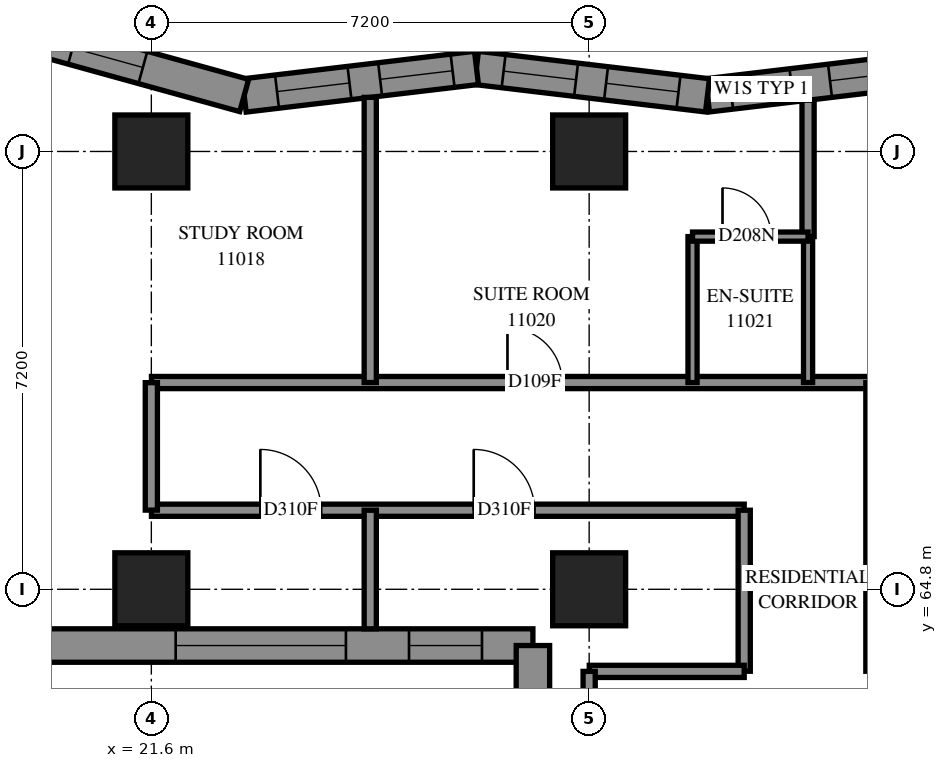
"""IFC4 building model, lengths in metres.
Left out: names, types, materials, properties, quantities, classifications, styles, units other than length and angle.
Written with IfcOpenShell. Run it as: python <this file> out.ifc"""

import sys

from ifc_helpers import new_model, si_unit, direction, frame, frame_2d, origin, origin_2d, place, context, subcontext, project, spatial, polyline, rectangle, outline, extrude, element, fill, save


model = new_model("IFC4")
c1 = context("Model", 3, precision=1e-05, world=origin(), true_north=direction((0.0, 1.0)))
c2 = subcontext(c1, "Body", "Model", "MODEL_VIEW")
j1 = project(units=[si_unit("LENGTHUNIT", "METRE"), si_unit("PLANEANGLEUNIT", "RADIAN")], contexts=[c1])
p1 = place(None, origin())
s1 = spatial("IfcSite", under=j1, at=p1, CompositionType="ELEMENT")
p2 = place(p1, origin())
s2 = spatial("IfcBuilding", under=s1, at=p2, CompositionType="ELEMENT")
p3 = place(p2, frame((0.0, 0.0, 44.0)))
s3 = spatial("IfcBuildingStorey", under=s2, at=p3, CompositionType="ELEMENT", Elevation=44.0)
for number, where, z_axis, x_axis in (
    (1, (21.6, 64.8, 0.0), (0.0, 0.0, 1.0), (1.0, 0.0, 0.0)),
    (2, (21.6, 72.0, 0.0), (0.0, 0.0, 1.0), (1.0, 0.0, 0.0)),
    (3, (28.8, 64.8, 0.0), (0.0, 0.0, 1.0), (1.0, 0.0, 0.0)),
    (4, (28.8, 72.0, 0.0), (0.0, 0.0, 1.0), (1.0, 0.0, 0.0)),
):
    element("IfcColumn", number, at=place(p3, frame(where, z_axis=z_axis, x_axis=x_axis)), inside=s3, PredefinedType="COLUMN", context=c2, shape_type="SweptSolid", body=[
        extrude(rectangle(XDim=1.2, YDim=1.2, at=origin_2d()), origin(), (0.0, 0.0, 1.0), 3.1),
    ])
p4 = place(p3, frame((34.545, 73.374, 0.0), z_axis=(0.0, 0.0, 1.0), x_axis=(-0.9930269402, -0.1178876415, 0.0)))
e5 = element("IfcWall", 5, at=p4, inside=s3, PredefinedType="SOLIDWALL", context=c2, shape_type="SweptSolid", body=[
    extrude(outline(polyline([(-0.033, -0.275), (3.793, -0.275), (3.858, 0.275), (0.033, 0.275), (-0.033, -0.275)])), origin(), (0.0, 0.0, 1.0), 3.1),
])
p5 = place(p4, frame((0.596, 0.0, 0.5)))
e6 = element("IfcOpeningElement", 6, at=p5, cuts=e5, PredefinedType="OPENING", context=c2, shape_type="SweptSolid", body=[
    extrude(rectangle(XDim=1.2, YDim=2.45, at=frame_2d((0.6, 1.225))), frame((0.0, 0.285, 0.0), z_axis=(0.0, -1.0, 0.0), x_axis=(1.0, 0.0, 0.0)), (0.0, 0.0, 1.0), 0.57),
])
p6 = place(p4, frame((2.434, 0.0, 0.45)))
e7 = element("IfcOpeningElement", 7, at=p6, cuts=e5, PredefinedType="OPENING", context=c2, shape_type="SweptSolid", body=[
    extrude(rectangle(XDim=1.0, YDim=2.5, at=frame_2d((0.5, 1.25))), frame((0.0, 0.285, 0.0), z_axis=(0.0, -1.0, 0.0), x_axis=(1.0, 0.0, 0.0)), (0.0, 0.0, 1.0), 0.57),
])
p7 = place(p3, frame((30.746, 72.923, 0.0), z_axis=(0.0, 0.0, 1.0), x_axis=(-0.9930269402, 0.1178876415, 0.0)))
e8 = element("IfcWall", 8, at=p7, inside=s3, PredefinedType="SOLIDWALL", context=c2, shape_type="SweptSolid", body=[
    extrude(outline(polyline([(0.033, -0.275), (3.858, -0.275), (3.793, 0.275), (-0.033, 0.275), (0.033, -0.275)])), origin(), (0.0, 0.0, 1.0), 3.1),
])
p8 = place(p7, frame((0.48, 0.0, 0.5)))
e9 = element("IfcOpeningElement", 9, at=p8, cuts=e8, PredefinedType="OPENING", context=c2, shape_type="SweptSolid", body=[
    extrude(rectangle(XDim=1.2, YDim=2.45, at=frame_2d((0.6, 1.225))), frame((0.0, 0.285, 0.0), z_axis=(0.0, -1.0, 0.0), x_axis=(1.0, 0.0, 0.0)), (0.0, 0.0, 1.0), 0.57),
])
p9 = place(p7, frame((2.176, 0.0, 0.5)))
e10 = element("IfcOpeningElement", 10, at=p9, cuts=e8, PredefinedType="OPENING", context=c2, shape_type="SweptSolid", body=[
    extrude(rectangle(XDim=1.2, YDim=2.45, at=frame_2d((0.6, 1.225))), frame((0.0, 0.285, 0.0), z_axis=(0.0, -1.0, 0.0), x_axis=(1.0, 0.0, 0.0)), (0.0, 0.0, 1.0), 0.57),
])
p10 = place(p3, frame((26.947, 73.374, 0.0), z_axis=(0.0, 0.0, 1.0), x_axis=(-0.9930244072, -0.1179089763, 0.0)))
e11 = element("IfcWall", 11, at=p10, inside=s3, PredefinedType="SOLIDWALL", context=c2, shape_type="SweptSolid", body=[
    extrude(outline(polyline([(-0.033, -0.275), (3.793, -0.275), (3.901, 0.275), (0.033, 0.275), (-0.033, -0.275)])), origin(), (0.0, 0.0, 1.0), 3.1),
])
p11 = place(p10, frame((0.396, 0.0, 0.5)))
e12 = element("IfcOpeningElement", 12, at=p11, cuts=e11, PredefinedType="OPENING", context=c2, shape_type="SweptSolid", body=[
    extrude(rectangle(XDim=1.2, YDim=2.45, at=frame_2d((0.6, 1.225))), frame((0.0, 0.285, 0.0), z_axis=(0.0, -1.0, 0.0), x_axis=(1.0, 0.0, 0.0)), (0.0, 0.0, 1.0), 0.57),
])
p12 = place(p10, frame((2.103, 0.0, 0.5)))
e13 = element("IfcOpeningElement", 13, at=p12, cuts=e11, PredefinedType="OPENING", context=c2, shape_type="SweptSolid", body=[
    extrude(rectangle(XDim=1.2, YDim=2.45, at=frame_2d((0.6, 1.225))), frame((0.0, 0.285, 0.0), z_axis=(0.0, -1.0, 0.0), x_axis=(1.0, 0.0, 0.0)), (0.0, 0.0, 1.0), 0.57),
])
p13 = place(p3, frame((23.127, 72.921, 0.0), z_axis=(0.0, 0.0, 1.0), x_axis=(-0.9637921646, 0.266654577, 0.0)))
e14 = element("IfcWall", 14, at=p13, inside=s3, PredefinedType="SOLIDWALL", context=c2, shape_type="SweptSolid", body=[
    extrude(outline(polyline([(0.054, -0.275), (3.996, -0.275), (3.273, 0.275), (-0.054, 0.275), (0.054, -0.275)])), origin(), (0.0, 0.0, 1.0), 3.1),
])
p14 = place(p13, frame((1.728, 0.0, 0.5)))
e15 = element("IfcOpeningElement", 15, at=p14, cuts=e14, PredefinedType="OPENING", context=c2, shape_type="SweptSolid", body=[
    extrude(rectangle(XDim=1.2, YDim=2.45, at=frame_2d((0.6, 1.225))), frame((0.0, 0.285, 0.0), z_axis=(0.0, -1.0, 0.0), x_axis=(1.0, 0.0, 0.0)), (0.0, 0.0, 1.0), 0.57),
])
p15 = place(p3, frame((19.624, 63.875, 0.0), z_axis=(0.0, 0.0, 1.0), x_axis=(1.0, 0.0, 0.0)))
e16 = element("IfcWall", 16, at=p15, inside=s3, PredefinedType="SOLIDWALL", context=c2, shape_type="SweptSolid", body=[
    extrude(outline(polyline([(-0.275, -0.275), (7.976, -0.275), (8.526, 0.275), (0.275, 0.275), (-0.275, -0.275)])), origin(), (0.0, 0.0, 1.0), 3.1),
])
p16 = place(p15, frame((2.376, 0.0, 0.5)))
e17 = element("IfcOpeningElement", 17, at=p16, cuts=e16, PredefinedType="OPENING", context=c2, shape_type="SweptSolid", body=[
    extrude(rectangle(XDim=2.8, YDim=2.45, at=frame_2d((1.4, 1.225))), frame((0.0, 0.285, 0.0), z_axis=(0.0, -1.0, 0.0), x_axis=(1.0, 0.0, 0.0)), (0.0, 0.0, 1.0), 0.57),
])
p17 = place(p15, frame((6.213, 0.0, 0.5)))
e18 = element("IfcOpeningElement", 18, at=p17, cuts=e16, PredefinedType="OPENING", context=c2, shape_type="SweptSolid", body=[
    extrude(rectangle(XDim=1.2, YDim=2.45, at=frame_2d((0.6, 1.225))), frame((0.0, 0.285, 0.0), z_axis=(0.0, -1.0, 0.0), x_axis=(1.0, 0.0, 0.0)), (0.0, 0.0, 1.0), 0.57),
])
p18 = place(p3, frame((27.875, 63.875, 0.0), z_axis=(0.0, 0.0, 1.0), x_axis=(0.0, -1.0, 0.0)))
e19 = element("IfcWall", 19, at=p18, inside=s3, PredefinedType="SOLIDWALL", context=c2, shape_type="SweptSolid", body=[
    extrude(outline(polyline([(0.275, -0.275), (7.475, -0.275), (6.925, 0.275), (-0.275, 0.275), (0.275, -0.275)])), origin(), (0.0, 0.0, 1.0), 3.1),
])
p19 = place(p18, frame((0.838, 0.0, 0.5)))
e20 = element("IfcOpeningElement", 20, at=p19, cuts=e19, PredefinedType="OPENING", context=c2, shape_type="SweptSolid", body=[
    extrude(rectangle(XDim=1.2, YDim=2.45, at=frame_2d((0.6, 1.225))), frame((0.0, 0.285, 0.0), z_axis=(0.0, -1.0, 0.0), x_axis=(1.0, 0.0, 0.0)), (0.0, 0.0, 1.0), 0.57),
])
p20 = place(p18, frame((3.3, 0.0, 0.45)))
e21 = element("IfcOpeningElement", 21, at=p20, cuts=e19, PredefinedType="OPENING", context=c2, shape_type="SweptSolid", body=[
    extrude(rectangle(XDim=1.3, YDim=2.5, at=frame_2d((0.65, 1.25))), frame((0.0, 0.285, 0.0), z_axis=(0.0, -1.0, 0.0), x_axis=(1.0, 0.0, 0.0)), (0.0, 0.0, 1.0), 0.57),
])
p21 = place(p18, frame((5.05, 0.0, 0.45)))
e22 = element("IfcOpeningElement", 22, at=p21, cuts=e19, PredefinedType="OPENING", context=c2, shape_type="SweptSolid", body=[
    extrude(rectangle(XDim=0.8, YDim=2.5, at=frame_2d((0.4, 1.25))), frame((0.0, 0.285, 0.0), z_axis=(0.0, -1.0, 0.0), x_axis=(1.0, 0.0, 0.0)), (0.0, 0.0, 1.0), 0.57),
])
p22 = place(p3, frame((21.602, 68.2, 0.0), z_axis=(0.0, 0.0, 1.0), x_axis=(1.0, 0.0, 0.0)))
e23 = element("IfcWall", 23, at=p22, inside=s3, PredefinedType="PARTITIONING", context=c2, shape_type="SweptSolid", body=[
    extrude(rectangle(XDim=11.848, YDim=0.2, at=frame_2d((5.924, 0.0))), origin(), (0.0, 0.0, 1.0), 3.1),
])
p23 = place(p22, frame((5.855, 0.0, 0.0)))
e24 = element("IfcOpeningElement", 24, at=p23, cuts=e23, PredefinedType="OPENING", context=c2, shape_type="SweptSolid", body=[
    extrude(rectangle(XDim=0.9, YDim=2.1, at=frame_2d((0.45, 1.05))), frame((0.0, 0.11, 0.0), z_axis=(0.0, -1.0, 0.0), x_axis=(1.0, 0.0, 0.0)), (0.0, 0.0, 1.0), 0.22),
])
p24 = place(p3, frame((21.602, 66.1, 0.0), z_axis=(0.0, 0.0, 1.0), x_axis=(1.0, 0.0, 0.0)))
e25 = element("IfcWall", 25, at=p24, inside=s3, PredefinedType="PARTITIONING", context=c2, shape_type="SweptSolid", body=[
    extrude(rectangle(XDim=9.748, YDim=0.2, at=frame_2d((4.874, 0.0))), origin(), (0.0, 0.0, 1.0), 3.1),
])
p25 = place(p24, frame((1.791, 0.0, 0.0)))
e26 = element("IfcOpeningElement", 26, at=p25, cuts=e25, PredefinedType="OPENING", context=c2, shape_type="SweptSolid", body=[
    extrude(rectangle(XDim=1.0, YDim=2.1, at=frame_2d((0.5, 1.05))), frame((0.0, 0.11, 0.0), z_axis=(0.0, -1.0, 0.0), x_axis=(1.0, 0.0, 0.0)), (0.0, 0.0, 1.0), 0.22),
])
p26 = place(p24, frame((5.3, 0.0, 0.0)))
e27 = element("IfcOpeningElement", 27, at=p26, cuts=e25, PredefinedType="OPENING", context=c2, shape_type="SweptSolid", body=[
    extrude(rectangle(XDim=1.0, YDim=2.1, at=frame_2d((0.5, 1.05))), frame((0.0, 0.11, 0.0), z_axis=(0.0, -1.0, 0.0), x_axis=(1.0, 0.0, 0.0)), (0.0, 0.0, 1.0), 0.22),
])
p27 = place(p3, frame((33.45, 63.452, 0.0), z_axis=(0.0, 0.0, 1.0), x_axis=(0.0, 1.0, 0.0)))
e28 = element("IfcWall", 28, at=p27, inside=s3, PredefinedType="PARTITIONING", context=c2, shape_type="SweptSolid", body=[
    extrude(rectangle(XDim=4.748, YDim=0.2, at=frame_2d((2.374, 0.0))), origin(), (0.0, 0.0, 1.0), 3.1),
])
p28 = place(p3, frame((25.2, 68.2, 0.0), z_axis=(0.0, 0.0, 1.0), x_axis=(0.0, 1.0, 0.0)))
e29 = element("IfcWall", 29, at=p28, inside=s3, PredefinedType="PARTITIONING", context=c2, shape_type="SweptSolid", body=[
    extrude(rectangle(XDim=4.69, YDim=0.2, at=frame_2d((2.345, 0.0))), origin(), (0.0, 0.0, 1.0), 3.1),
])
p29 = place(p3, frame((31.35, 63.452, 0.0), z_axis=(0.0, 0.0, 1.0), x_axis=(0.0, 1.0, 0.0)))
e30 = element("IfcWall", 30, at=p29, inside=s3, PredefinedType="PARTITIONING", context=c2, shape_type="SweptSolid", body=[
    extrude(rectangle(XDim=2.648, YDim=0.2, at=frame_2d((1.324, 0.0))), origin(), (0.0, 0.0, 1.0), 3.1),
])
p30 = place(p3, frame((28.802, 63.45, 0.0), z_axis=(0.0, 0.0, 1.0), x_axis=(1.0, 0.0, 0.0)))
e31 = element("IfcWall", 31, at=p30, inside=s3, PredefinedType="PARTITIONING", context=c2, shape_type="SweptSolid", body=[
    extrude(rectangle(XDim=2.548, YDim=0.2, at=frame_2d((1.274, 0.0))), origin(), (0.0, 0.0, 1.0), 3.1),
])
for number, where, z_axis, x_axis in (
    (32, (30.5, 68.2, 0.0), (0.0, 0.0, 1.0), (0.0, 1.0, 0.0)),
    (33, (32.4, 68.2, 0.0), (0.0, 0.0, 1.0), (0.0, 1.0, 0.0)),
):
    element("IfcWall", number, at=place(p3, frame(where, z_axis=z_axis, x_axis=x_axis)), inside=s3, PredefinedType="PARTITIONING", context=c2, shape_type="SweptSolid", body=[
        extrude(rectangle(XDim=2.4, YDim=0.15, at=frame_2d((1.2, 0.0))), origin(), (0.0, 0.0, 1.0), 3.1),
    ])
p31 = place(p3, frame((32.4, 70.6, 0.0), z_axis=(0.0, 0.0, 1.0), x_axis=(0.0, 1.0, 0.0)))
e34 = element("IfcWall", 34, at=p31, inside=s3, PredefinedType="PARTITIONING", context=c2, shape_type="SweptSolid", body=[
    extrude(rectangle(XDim=2.243, YDim=0.2, at=frame_2d((1.121, 0.0))), origin(), (0.0, 0.0, 1.0), 3.1),
])
p32 = place(p3, frame((28.8, 61.35, 0.0), z_axis=(0.0, 0.0, 1.0), x_axis=(0.0, 1.0, 0.0)))
e35 = element("IfcWall", 35, at=p32, inside=s3, PredefinedType="PARTITIONING", context=c2, shape_type="SweptSolid", body=[
    extrude(rectangle(XDim=2.1, YDim=0.2, at=frame_2d((1.05, 0.0))), origin(), (0.0, 0.0, 1.0), 2.6),
])
p33 = place(p3, frame((21.6, 66.102, 0.0), z_axis=(0.0, 0.0, 1.0), x_axis=(0.0, 1.0, 0.0)))
e36 = element("IfcWall", 36, at=p33, inside=s3, PredefinedType="PARTITIONING", context=c2, shape_type="SweptSolid", body=[
    extrude(rectangle(XDim=2.096, YDim=0.2, at=frame_2d((1.048, 0.0))), origin(), (0.0, 0.0, 1.0), 2.6),
])
p34 = place(p3, frame((30.5, 70.6, 0.0), z_axis=(0.0, 0.0, 1.0), x_axis=(1.0, 0.0, 0.0)))
e37 = element("IfcWall", 37, at=p34, inside=s3, PredefinedType="PARTITIONING", context=c2, shape_type="SweptSolid", body=[
    extrude(rectangle(XDim=1.9, YDim=0.15, at=frame_2d((0.95, 0.0))), origin(), (0.0, 0.0, 1.0), 3.1),
])
p35 = place(p34, frame((0.493, 0.0, 0.0)))
e38 = element("IfcOpeningElement", 38, at=p35, cuts=e37, PredefinedType="OPENING", context=c2, shape_type="SweptSolid", body=[
    extrude(rectangle(XDim=0.8, YDim=2.1, at=frame_2d((0.4, 1.05))), frame((0.0, 0.085, 0.0), z_axis=(0.0, -1.0, 0.0), x_axis=(1.0, 0.0, 0.0)), (0.0, 0.0, 1.0), 0.17),
])
p36 = place(p3, frame((25.2, 64.15, 0.0), z_axis=(0.0, 0.0, 1.0), x_axis=(0.0, 1.0, 0.0)))
e39 = element("IfcWall", 39, at=p36, inside=s3, PredefinedType="PARTITIONING", context=c2, shape_type="SweptSolid", body=[
    extrude(rectangle(XDim=1.95, YDim=0.2, at=frame_2d((0.975, 0.0))), origin(), (0.0, 0.0, 1.0), 3.1),
])
p37 = place(p5, origin())
e40 = element("IfcWindow", 40, at=p37, inside=s3, PartitioningType="SINGLE_PANEL", PredefinedType="WINDOW", context=c2, shape_type="SweptSolid", body=[
    extrude(rectangle(XDim=1.2, YDim=2.45, at=frame_2d((0.6, 1.225))), frame((0.0, 0.155, 0.0), z_axis=(0.0, -1.0, 0.0), x_axis=(1.0, 0.0, 0.0)), (0.0, 0.0, 1.0), 0.06),
])
fill(e6, e40)
p38 = place(p8, origin())
e41 = element("IfcWindow", 41, at=p38, inside=s3, PartitioningType="SINGLE_PANEL", PredefinedType="WINDOW", context=c2, shape_type="SweptSolid", body=[
    extrude(rectangle(XDim=1.2, YDim=2.45, at=frame_2d((0.6, 1.225))), frame((0.0, 0.155, 0.0), z_axis=(0.0, -1.0, 0.0), x_axis=(1.0, 0.0, 0.0)), (0.0, 0.0, 1.0), 0.06),
])
fill(e9, e41)
p39 = place(p9, origin())
e42 = element("IfcWindow", 42, at=p39, inside=s3, PartitioningType="SINGLE_PANEL", PredefinedType="WINDOW", context=c2, shape_type="SweptSolid", body=[
    extrude(rectangle(XDim=1.2, YDim=2.45, at=frame_2d((0.6, 1.225))), frame((0.0, 0.155, 0.0), z_axis=(0.0, -1.0, 0.0), x_axis=(1.0, 0.0, 0.0)), (0.0, 0.0, 1.0), 0.06),
])
fill(e10, e42)
p40 = place(p11, origin())
e43 = element("IfcWindow", 43, at=p40, inside=s3, PartitioningType="SINGLE_PANEL", PredefinedType="WINDOW", context=c2, shape_type="SweptSolid", body=[
    extrude(rectangle(XDim=1.2, YDim=2.45, at=frame_2d((0.6, 1.225))), frame((0.0, 0.155, 0.0), z_axis=(0.0, -1.0, 0.0), x_axis=(1.0, 0.0, 0.0)), (0.0, 0.0, 1.0), 0.06),
])
fill(e12, e43)
p41 = place(p12, origin())
e44 = element("IfcWindow", 44, at=p41, inside=s3, PartitioningType="SINGLE_PANEL", PredefinedType="WINDOW", context=c2, shape_type="SweptSolid", body=[
    extrude(rectangle(XDim=1.2, YDim=2.45, at=frame_2d((0.6, 1.225))), frame((0.0, 0.155, 0.0), z_axis=(0.0, -1.0, 0.0), x_axis=(1.0, 0.0, 0.0)), (0.0, 0.0, 1.0), 0.06),
])
fill(e13, e44)
p42 = place(p14, origin())
e45 = element("IfcWindow", 45, at=p42, inside=s3, PartitioningType="SINGLE_PANEL", PredefinedType="WINDOW", context=c2, shape_type="SweptSolid", body=[
    extrude(rectangle(XDim=1.2, YDim=2.45, at=frame_2d((0.6, 1.225))), frame((0.0, 0.155, 0.0), z_axis=(0.0, -1.0, 0.0), x_axis=(1.0, 0.0, 0.0)), (0.0, 0.0, 1.0), 0.06),
])
fill(e15, e45)
p43 = place(p16, origin())
e46 = element("IfcWindow", 46, at=p43, inside=s3, PartitioningType="SINGLE_PANEL", PredefinedType="WINDOW", context=c2, shape_type="SweptSolid", body=[
    extrude(rectangle(XDim=2.8, YDim=2.45, at=frame_2d((1.4, 1.225))), frame((0.0, 0.155, 0.0), z_axis=(0.0, -1.0, 0.0), x_axis=(1.0, 0.0, 0.0)), (0.0, 0.0, 1.0), 0.06),
])
fill(e17, e46)
p44 = place(p17, origin())
e47 = element("IfcWindow", 47, at=p44, inside=s3, PartitioningType="SINGLE_PANEL", PredefinedType="WINDOW", context=c2, shape_type="SweptSolid", body=[
    extrude(rectangle(XDim=1.2, YDim=2.45, at=frame_2d((0.6, 1.225))), frame((0.0, 0.155, 0.0), z_axis=(0.0, -1.0, 0.0), x_axis=(1.0, 0.0, 0.0)), (0.0, 0.0, 1.0), 0.06),
])
fill(e18, e47)
p45 = place(p25, origin())
e48 = element("IfcDoor", 48, at=p45, inside=s3, OperationType="SINGLE_SWING_RIGHT", PredefinedType="DOOR", context=c2, shape_type="SweptSolid", body=[
    extrude(rectangle(XDim=1.0, YDim=2.1, at=frame_2d((0.5, 1.05))), frame((0.0, 0.025, 0.0), z_axis=(0.0, -1.0, 0.0), x_axis=(1.0, 0.0, 0.0)), (0.0, 0.0, 1.0), 0.05),
])
fill(e26, e48)
p46 = place(p26, origin())
e49 = element("IfcDoor", 49, at=p46, inside=s3, OperationType="SINGLE_SWING_RIGHT", PredefinedType="DOOR", context=c2, shape_type="SweptSolid", body=[
    extrude(rectangle(XDim=1.0, YDim=2.1, at=frame_2d((0.5, 1.05))), frame((0.0, 0.025, 0.0), z_axis=(0.0, -1.0, 0.0), x_axis=(1.0, 0.0, 0.0)), (0.0, 0.0, 1.0), 0.05),
])
fill(e27, e49)
p47 = place(p23, origin())
e50 = element("IfcDoor", 50, at=p47, inside=s3, OperationType="SINGLE_SWING_LEFT", PredefinedType="DOOR", context=c2, shape_type="SweptSolid", body=[
    extrude(rectangle(XDim=0.9, YDim=2.1, at=frame_2d((0.45, 1.05))), frame((0.0, 0.025, 0.0), z_axis=(0.0, -1.0, 0.0), x_axis=(1.0, 0.0, 0.0)), (0.0, 0.0, 1.0), 0.05),
])
fill(e24, e50)
p48 = place(p35, origin())
e51 = element("IfcDoor", 51, at=p48, inside=s3, OperationType="SINGLE_SWING_RIGHT", PredefinedType="DOOR", context=c2, shape_type="SweptSolid", body=[
    extrude(rectangle(XDim=0.8, YDim=2.1, at=frame_2d((0.4, 1.05))), frame((0.0, 0.025, 0.0), z_axis=(0.0, -1.0, 0.0), x_axis=(1.0, 0.0, 0.0)), (0.0, 0.0, 1.0), 0.05),
])
fill(e38, e51)
p49 = place(p6, origin())
e52 = element("IfcWindow", 52, at=p49, inside=s3, PartitioningType="SINGLE_PANEL", PredefinedType="WINDOW", context=c2, shape_type="SweptSolid", body=[
    extrude(rectangle(XDim=1.0, YDim=2.5, at=frame_2d((0.5, 1.25))), frame((0.0, 0.155, 0.0), z_axis=(0.0, -1.0, 0.0), x_axis=(1.0, 0.0, 0.0)), (0.0, 0.0, 1.0), 0.06),
])
fill(e7, e52)
save(model, sys.argv[1])
